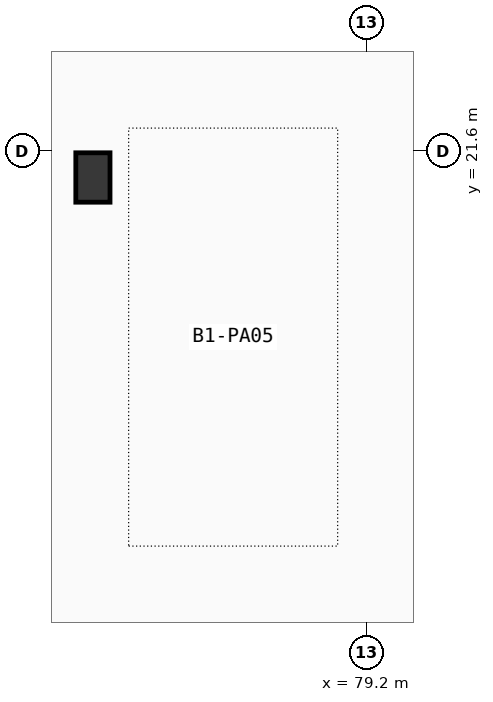
"""IFC4 building model, lengths in metres.
Left out: names, types, materials, properties, quantities, classifications, styles, units other than length and angle.
Written with IfcOpenShell. Run it as: python <this file> out.ifc"""

import sys

from ifc_helpers import new_model, si_unit, direction, frame, origin, origin_2d, place, context, subcontext, project, spatial, rectangle, extrude, element, save


model = new_model("IFC4")
c1 = context("Model", 3, precision=1e-05, world=origin(), true_north=direction((0.0, 1.0)))
c2 = subcontext(c1, "Body", "Model", "MODEL_VIEW")
j1 = project(units=[si_unit("LENGTHUNIT", "METRE"), si_unit("PLANEANGLEUNIT", "RADIAN")], contexts=[c1])
p1 = place(None, origin())
s1 = spatial("IfcSite", under=j1, at=p1, CompositionType="ELEMENT")
p2 = place(p1, origin())
s2 = spatial("IfcBuilding", under=s1, at=p2, CompositionType="ELEMENT")
p3 = place(p2, frame((0.0, 0.0, -4.2)))
s3 = spatial("IfcBuildingStorey", under=s2, at=p3, CompositionType="ELEMENT", Elevation=-4.2)
p4 = place(p3, frame((75.6, 21.25, 0.0), z_axis=(0.0, 0.0, 1.0), x_axis=(1.0, 0.0, 0.0)))
e1 = element("IfcColumn", 1, at=p4, inside=s3, PredefinedType="PILASTER", context=c2, shape_type="SweptSolid", body=[
    extrude(rectangle(XDim=0.45, YDim=0.65, at=origin_2d()), origin(), (0.0, 0.0, 1.0), 4.2),
])
save(model, sys.argv[1])
